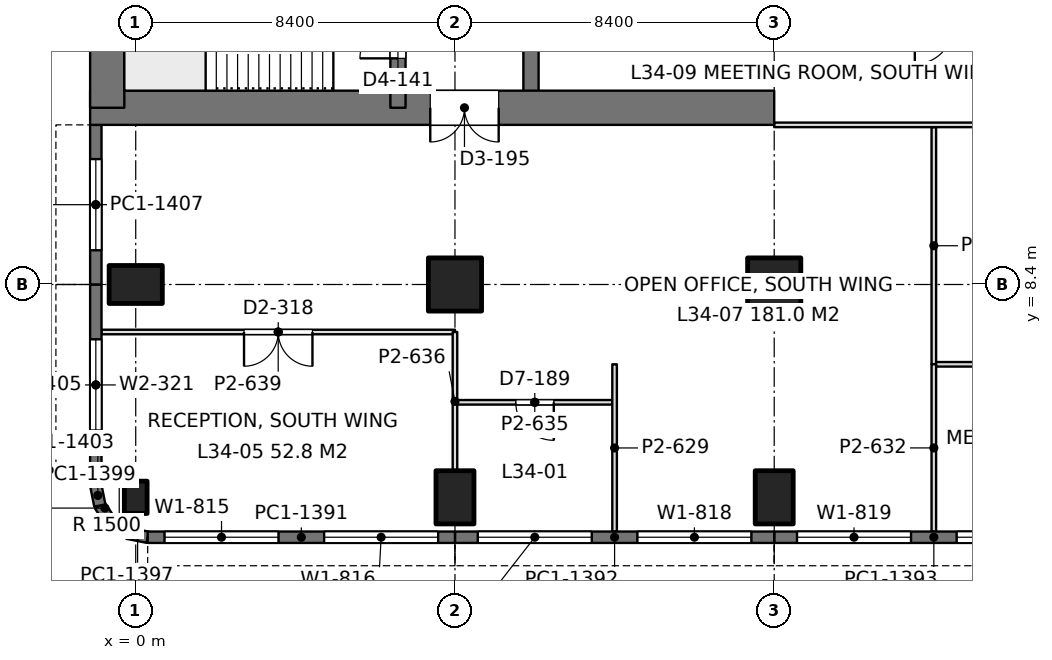
"""IFC4 building model, lengths in metres.
Left out: names, types, materials, properties, quantities, classifications, styles, units other than length and angle.
Written with IfcOpenShell. Run it as: python <this file> out.ifc"""

import sys

from ifc_helpers import new_model, si_unit, direction, frame, frame_2d, origin, origin_2d, place, context, subcontext, project, spatial, rectangle, extrude, element, fill, save


model = new_model("IFC4")
c1 = context("Model", 3, precision=1e-05, world=origin(), true_north=direction((0.0, 1.0)))
c2 = subcontext(c1, "Body", "Model", "MODEL_VIEW")
j1 = project(units=[si_unit("LENGTHUNIT", "METRE"), si_unit("PLANEANGLEUNIT", "RADIAN")], contexts=[c1])
p1 = place(None, origin())
s1 = spatial("IfcSite", under=j1, at=p1, CompositionType="ELEMENT")
p2 = place(p1, origin())
s2 = spatial("IfcBuilding", under=s1, at=p2, CompositionType="ELEMENT")
p3 = place(p2, frame((0.0, 0.0, 151.2)))
s3 = spatial("IfcBuildingStorey", under=s2, at=p3, CompositionType="ELEMENT", Elevation=151.2)
p4 = place(p3, frame((0.0, 2.8, 0.0), z_axis=(0.0, 0.0, 1.0), x_axis=(1.0, 0.0, 0.0)))
e1 = element("IfcColumn", 1, at=p4, inside=s3, PredefinedType="COLUMN", context=c2, shape_type="SweptSolid", body=[
    extrude(rectangle(XDim=0.6, YDim=0.85, at=origin_2d()), origin(), (0.0, 0.0, 1.0), 4.2),
])
for number, where, z_axis, x_axis in (
    (2, (0.0, 8.4, 0.0), (0.0, 0.0, 1.0), (0.0, 1.0, 0.0)),
    (3, (8.4, 2.8, 0.0), (0.0, 0.0, 1.0), (1.0, 0.0, 0.0)),
):
    element("IfcColumn", number, at=place(p3, frame(where, z_axis=z_axis, x_axis=x_axis)), inside=s3, PredefinedType="COLUMN", context=c2, shape_type="SweptSolid", body=[
        extrude(rectangle(XDim=1.0, YDim=1.4, at=origin_2d()), origin(), (0.0, 0.0, 1.0), 4.2),
    ])
p5 = place(p3, frame((8.4, 8.4, 0.0), z_axis=(0.0, 0.0, 1.0), x_axis=(1.0, 0.0, 0.0)))
e4 = element("IfcColumn", 4, at=p5, inside=s3, PredefinedType="COLUMN", context=c2, shape_type="SweptSolid", body=[
    extrude(rectangle(XDim=1.4, YDim=1.4, at=origin_2d()), origin(), (0.0, 0.0, 1.0), 4.2),
])
p6 = place(p3, frame((16.8, 2.8, 0.0), z_axis=(0.0, 0.0, 1.0), x_axis=(1.0, 0.0, 0.0)))
e5 = element("IfcColumn", 5, at=p6, inside=s3, PredefinedType="COLUMN", context=c2, shape_type="SweptSolid", body=[
    extrude(rectangle(XDim=1.0, YDim=1.4, at=origin_2d()), origin(), (0.0, 0.0, 1.0), 4.2),
])
p7 = place(p3, frame((16.8, 8.4, 0.0), z_axis=(0.0, 0.0, 1.0), x_axis=(1.0, 0.0, 0.0)))
e6 = element("IfcColumn", 6, at=p7, inside=s3, PredefinedType="COLUMN", context=c2, shape_type="SweptSolid", body=[
    extrude(rectangle(XDim=1.4, YDim=1.4, at=origin_2d()), origin(), (0.0, 0.0, 1.0), 4.2),
])
p8 = place(p3, frame((-1.2, 13.05, 0.0), z_axis=(0.0, 0.0, 1.0), x_axis=(1.0, 0.0, 0.0)))
e7 = element("IfcWall", 7, at=p8, inside=s3, PredefinedType="SHEAR", context=c2, shape_type="SweptSolid", body=[
    extrude(rectangle(XDim=18.0, YDim=0.9, at=frame_2d((9.0, 0.0))), origin(), (0.0, 0.0, 1.0), 4.2),
])
p9 = place(p8, frame((8.95, 0.0, 0.0)))
e8 = element("IfcOpeningElement", 8, at=p9, cuts=e7, PredefinedType="OPENING", context=c2, shape_type="SweptSolid", body=[
    extrude(rectangle(XDim=1.8, YDim=2.4, at=frame_2d((0.9, 1.2))), frame((0.0, 0.46, 0.0), z_axis=(0.0, -1.0, 0.0), x_axis=(1.0, 0.0, 0.0)), (0.0, 0.0, 1.0), 0.92),
])
p10 = place(p3, frame((-0.75, 13.05, 0.0), z_axis=(0.0, 0.0, 1.0), x_axis=(0.0, 1.0, 0.0)))
e9 = element("IfcWall", 9, at=p10, inside=s3, PredefinedType="SHEAR", context=c2, shape_type="SweptSolid", body=[
    extrude(rectangle(XDim=24.3, YDim=0.9, at=frame_2d((12.15, 0.0))), origin(), (0.0, 0.0, 1.0), 4.2),
])
p11 = place(p3, frame((6.9, 13.05, 0.0), z_axis=(0.0, 0.0, 1.0), x_axis=(0.0, 1.0, 0.0)))
e10 = element("IfcWall", 10, at=p11, inside=s3, PredefinedType="SHEAR", context=c2, shape_type="SweptSolid", body=[
    extrude(rectangle(XDim=24.3, YDim=0.4, at=frame_2d((12.15, 0.0))), origin(), (0.0, 0.0, 1.0), 4.2),
])
p12 = place(p11, frame((1.3, 0.0, 0.0)))
e11 = element("IfcOpeningElement", 11, at=p12, cuts=e10, PredefinedType="OPENING", context=c2, shape_type="SweptSolid", body=[
    extrude(rectangle(XDim=1.0, YDim=2.2, at=frame_2d((0.5, 1.1))), frame((0.0, 0.21, 0.0), z_axis=(0.0, -1.0, 0.0), x_axis=(1.0, 0.0, 0.0)), (0.0, 0.0, 1.0), 0.42),
])
p13 = place(p11, frame((22.0, 0.0, 0.0)))
e12 = element("IfcOpeningElement", 12, at=p13, cuts=e10, PredefinedType="OPENING", context=c2, shape_type="SweptSolid", body=[
    extrude(rectangle(XDim=1.0, YDim=2.2, at=frame_2d((0.5, 1.1))), frame((0.0, 0.21, 0.0), z_axis=(0.0, -1.0, 0.0), x_axis=(1.0, 0.0, 0.0)), (0.0, 0.0, 1.0), 0.42),
])
p14 = place(p11, frame((5.55, 0.0, 0.0)))
e13 = element("IfcOpeningElement", 13, at=p14, cuts=e10, PredefinedType="OPENING", context=c2, shape_type="SweptSolid", body=[
    extrude(rectangle(XDim=1.0, YDim=2.2, at=frame_2d((0.5, 1.1))), frame((0.0, 0.21, 0.0), z_axis=(0.0, -1.0, 0.0), x_axis=(1.0, 0.0, 0.0)), (0.0, 0.0, 1.0), 0.42),
])
p15 = place(p11, frame((9.55, 0.0, 0.0)))
e14 = element("IfcOpeningElement", 14, at=p15, cuts=e10, PredefinedType="OPENING", context=c2, shape_type="SweptSolid", body=[
    extrude(rectangle(XDim=1.0, YDim=2.2, at=frame_2d((0.5, 1.1))), frame((0.0, 0.21, 0.0), z_axis=(0.0, -1.0, 0.0), x_axis=(1.0, 0.0, 0.0)), (0.0, 0.0, 1.0), 0.42),
])
p16 = place(p11, frame((12.8, 0.0, 0.0)))
e15 = element("IfcOpeningElement", 15, at=p16, cuts=e10, PredefinedType="OPENING", context=c2, shape_type="SweptSolid", body=[
    extrude(rectangle(XDim=1.1, YDim=2.2, at=frame_2d((0.55, 1.1))), frame((0.0, 0.21, 0.0), z_axis=(0.0, -1.0, 0.0), x_axis=(1.0, 0.0, 0.0)), (0.0, 0.0, 1.0), 0.42),
])
p17 = place(p11, frame((15.538, 0.0, 0.0)))
e16 = element("IfcOpeningElement", 16, at=p17, cuts=e10, PredefinedType="OPENING", context=c2, shape_type="SweptSolid", body=[
    extrude(rectangle(XDim=1.1, YDim=2.2, at=frame_2d((0.55, 1.1))), frame((0.0, 0.21, 0.0), z_axis=(0.0, -1.0, 0.0), x_axis=(1.0, 0.0, 0.0)), (0.0, 0.0, 1.0), 0.42),
])
p18 = place(p11, frame((18.262, 0.0, 0.0)))
e17 = element("IfcOpeningElement", 17, at=p18, cuts=e10, PredefinedType="OPENING", context=c2, shape_type="SweptSolid", body=[
    extrude(rectangle(XDim=1.1, YDim=2.2, at=frame_2d((0.55, 1.1))), frame((0.0, 0.21, 0.0), z_axis=(0.0, -1.0, 0.0), x_axis=(1.0, 0.0, 0.0)), (0.0, 0.0, 1.0), 0.42),
])
p19 = place(p3, frame((10.4, 13.05, 0.0), z_axis=(0.0, 0.0, 1.0), x_axis=(0.0, 1.0, 0.0)))
e18 = element("IfcWall", 18, at=p19, inside=s3, PredefinedType="SHEAR", context=c2, shape_type="SweptSolid", body=[
    extrude(rectangle(XDim=24.3, YDim=0.4, at=frame_2d((12.15, 0.0))), origin(), (0.0, 0.0, 1.0), 4.2),
])
p20 = place(p19, frame((10.05, 0.0, 0.0)))
e19 = element("IfcOpeningElement", 19, at=p20, cuts=e18, PredefinedType="OPENING", context=c2, shape_type="SweptSolid", body=[
    extrude(rectangle(XDim=1.1, YDim=2.2, at=frame_2d((0.55, 1.1))), frame((0.0, 0.21, 0.0), z_axis=(0.0, -1.0, 0.0), x_axis=(1.0, 0.0, 0.0)), (0.0, 0.0, 1.0), 0.42),
])
p21 = place(p19, frame((12.9, 0.0, 0.0)))
e20 = element("IfcOpeningElement", 20, at=p21, cuts=e18, PredefinedType="OPENING", context=c2, shape_type="SweptSolid", body=[
    extrude(rectangle(XDim=1.1, YDim=2.2, at=frame_2d((0.55, 1.1))), frame((0.0, 0.21, 0.0), z_axis=(0.0, -1.0, 0.0), x_axis=(1.0, 0.0, 0.0)), (0.0, 0.0, 1.0), 0.42),
])
p22 = place(p19, frame((21.45, 0.0, 0.0)))
e21 = element("IfcOpeningElement", 21, at=p22, cuts=e18, PredefinedType="OPENING", context=c2, shape_type="SweptSolid", body=[
    extrude(rectangle(XDim=1.1, YDim=2.2, at=frame_2d((0.55, 1.1))), frame((0.0, 0.21, 0.0), z_axis=(0.0, -1.0, 0.0), x_axis=(1.0, 0.0, 0.0)), (0.0, 0.0, 1.0), 0.42),
])
p23 = place(p19, frame((2.35, 0.0, 0.0)))
e22 = element("IfcOpeningElement", 22, at=p23, cuts=e18, PredefinedType="OPENING", context=c2, shape_type="SweptSolid", body=[
    extrude(rectangle(XDim=1.8, YDim=2.4, at=frame_2d((0.9, 1.2))), frame((0.0, 0.21, 0.0), z_axis=(0.0, -1.0, 0.0), x_axis=(1.0, 0.0, 0.0)), (0.0, 0.0, 1.0), 0.42),
])
p24 = place(p19, frame((5.8, 0.0, 0.0)))
e23 = element("IfcOpeningElement", 23, at=p24, cuts=e18, PredefinedType="OPENING", context=c2, shape_type="SweptSolid", body=[
    extrude(rectangle(XDim=1.8, YDim=2.4, at=frame_2d((0.9, 1.2))), frame((0.0, 0.21, 0.0), z_axis=(0.0, -1.0, 0.0), x_axis=(1.0, 0.0, 0.0)), (0.0, 0.0, 1.0), 0.42),
])
p25 = place(p3, frame((25.2, 1.75, 0.0), z_axis=(0.0, 0.0, 1.0), x_axis=(-1.0, 0.0, 0.0)))
e24 = element("IfcWall", 24, at=p25, inside=s3, PredefinedType="SOLIDWALL", context=c2, shape_type="SweptSolid", body=[
    extrude(rectangle(XDim=8.4, YDim=0.3, at=frame_2d((4.2, 0.0))), origin(), (0.0, 0.0, 1.0), 4.05),
])
p26 = place(p25, frame((0.6, 0.0, 0.9)))
e25 = element("IfcOpeningElement", 25, at=p26, cuts=e24, PredefinedType="OPENING", context=c2, shape_type="SweptSolid", body=[
    extrude(rectangle(XDim=3.0, YDim=1.9, at=frame_2d((1.5, 0.95))), frame((0.0, 0.16, 0.0), z_axis=(0.0, -1.0, 0.0), x_axis=(1.0, 0.0, 0.0)), (0.0, 0.0, 1.0), 0.32),
])
p27 = place(p25, frame((4.8, 0.0, 0.9)))
e26 = element("IfcOpeningElement", 26, at=p27, cuts=e24, PredefinedType="OPENING", context=c2, shape_type="SweptSolid", body=[
    extrude(rectangle(XDim=3.0, YDim=1.9, at=frame_2d((1.5, 0.95))), frame((0.0, 0.16, 0.0), z_axis=(0.0, -1.0, 0.0), x_axis=(1.0, 0.0, 0.0)), (0.0, 0.0, 1.0), 0.32),
])
p28 = place(p3, frame((16.8, 1.75, 0.0), z_axis=(0.0, 0.0, 1.0), x_axis=(-1.0, 0.0, 0.0)))
e27 = element("IfcWall", 27, at=p28, inside=s3, PredefinedType="SOLIDWALL", context=c2, shape_type="SweptSolid", body=[
    extrude(rectangle(XDim=8.4, YDim=0.3, at=frame_2d((4.2, 0.0))), origin(), (0.0, 0.0, 1.0), 4.05),
])
p29 = place(p28, frame((0.6, 0.0, 0.9)))
e28 = element("IfcOpeningElement", 28, at=p29, cuts=e27, PredefinedType="OPENING", context=c2, shape_type="SweptSolid", body=[
    extrude(rectangle(XDim=3.0, YDim=1.9, at=frame_2d((1.5, 0.95))), frame((0.0, 0.16, 0.0), z_axis=(0.0, -1.0, 0.0), x_axis=(1.0, 0.0, 0.0)), (0.0, 0.0, 1.0), 0.32),
])
p30 = place(p28, frame((4.8, 0.0, 0.9)))
e29 = element("IfcOpeningElement", 29, at=p30, cuts=e27, PredefinedType="OPENING", context=c2, shape_type="SweptSolid", body=[
    extrude(rectangle(XDim=3.0, YDim=1.9, at=frame_2d((1.5, 0.95))), frame((0.0, 0.16, 0.0), z_axis=(0.0, -1.0, 0.0), x_axis=(1.0, 0.0, 0.0)), (0.0, 0.0, 1.0), 0.32),
])
p31 = place(p3, frame((8.4, 1.75, 0.0), z_axis=(0.0, 0.0, 1.0), x_axis=(-1.0, 0.0, 0.0)))
e30 = element("IfcWall", 30, at=p31, inside=s3, PredefinedType="SOLIDWALL", context=c2, shape_type="SweptSolid", body=[
    extrude(rectangle(XDim=8.085, YDim=0.3, at=frame_2d((4.042, 0.0))), origin(), (0.0, 0.0, 1.0), 4.05),
])
p32 = place(p31, frame((0.443, 0.0, 0.9)))
e31 = element("IfcOpeningElement", 31, at=p32, cuts=e30, PredefinedType="OPENING", context=c2, shape_type="SweptSolid", body=[
    extrude(rectangle(XDim=3.0, YDim=1.9, at=frame_2d((1.5, 0.95))), frame((0.0, 0.16, 0.0), z_axis=(0.0, -1.0, 0.0), x_axis=(1.0, 0.0, 0.0)), (0.0, 0.0, 1.0), 0.32),
])
p33 = place(p31, frame((4.643, 0.0, 0.9)))
e32 = element("IfcOpeningElement", 32, at=p33, cuts=e30, PredefinedType="OPENING", context=c2, shape_type="SweptSolid", body=[
    extrude(rectangle(XDim=3.0, YDim=1.9, at=frame_2d((1.5, 0.95))), frame((0.0, 0.16, 0.0), z_axis=(0.0, -1.0, 0.0), x_axis=(1.0, 0.0, 0.0)), (0.0, 0.0, 1.0), 0.32),
])
p34 = place(p3, frame((0.315, 1.75, 0.0), z_axis=(0.0, 0.0, 1.0), x_axis=(-0.980788534345, 0.195073962632, 0.0)))
e33 = element("IfcWall", 33, at=p34, inside=s3, PredefinedType="SOLIDWALL", context=c2, shape_type="SweptSolid", body=[
    extrude(rectangle(XDim=0.541, YDim=0.3, at=frame_2d((0.271, 0.0))), origin(), (0.0, 0.0, 1.0), 4.05),
])
for number, where, z_axis, x_axis in (
    (34, (-0.216, 1.855, 0.0), (0.0, 0.0, 1.0), (-0.831, 0.556, 0.0)),
    (35, (-0.653, 2.147, 0.0), (0.0, 0.0, 1.0), (-0.556, 0.831, 0.0)),
):
    element("IfcWall", number, at=place(p3, frame(where, z_axis=z_axis, x_axis=x_axis)), inside=s3, PredefinedType="SOLIDWALL", context=c2, shape_type="SweptSolid", body=[
        extrude(rectangle(XDim=0.526, YDim=0.3, at=frame_2d((0.263, 0.0))), origin(), (0.0, 0.0, 1.0), 4.05),
    ])
p35 = place(p3, frame((-0.945, 2.584, 0.0), z_axis=(0.0, 0.0, 1.0), x_axis=(-0.195073962632, 0.980788534345, 0.0)))
e36 = element("IfcWall", 36, at=p35, inside=s3, PredefinedType="SOLIDWALL", context=c2, shape_type="SweptSolid", body=[
    extrude(rectangle(XDim=0.541, YDim=0.3, at=frame_2d((0.271, 0.0))), origin(), (0.0, 0.0, 1.0), 4.05),
])
p36 = place(p3, frame((-1.05, 3.115, 0.0), z_axis=(0.0, 0.0, 1.0), x_axis=(0.0, 1.0, 0.0)))
e37 = element("IfcWall", 37, at=p36, inside=s3, PredefinedType="SOLIDWALL", context=c2, shape_type="SweptSolid", body=[
    extrude(rectangle(XDim=5.285, YDim=0.3, at=frame_2d((2.643, 0.0))), origin(), (0.0, 0.0, 1.0), 4.05),
])
p37 = place(p36, frame((1.443, 0.0, 0.9)))
e38 = element("IfcOpeningElement", 38, at=p37, cuts=e37, PredefinedType="OPENING", context=c2, shape_type="SweptSolid", body=[
    extrude(rectangle(XDim=2.4, YDim=1.9, at=frame_2d((1.2, 0.95))), frame((0.0, 0.16, 0.0), z_axis=(0.0, -1.0, 0.0), x_axis=(1.0, 0.0, 0.0)), (0.0, 0.0, 1.0), 0.32),
])
p38 = place(p3, frame((-1.05, 8.4, 0.0), z_axis=(0.0, 0.0, 1.0), x_axis=(0.0, 1.0, 0.0)))
e39 = element("IfcWall", 39, at=p38, inside=s3, PredefinedType="SOLIDWALL", context=c2, shape_type="SweptSolid", body=[
    extrude(rectangle(XDim=4.2, YDim=0.3, at=frame_2d((2.1, 0.0))), origin(), (0.0, 0.0, 1.0), 4.05),
])
p39 = place(p38, frame((0.9, 0.0, 0.9)))
e40 = element("IfcOpeningElement", 40, at=p39, cuts=e39, PredefinedType="OPENING", context=c2, shape_type="SweptSolid", body=[
    extrude(rectangle(XDim=2.4, YDim=1.9, at=frame_2d((1.2, 0.95))), frame((0.0, 0.16, 0.0), z_axis=(0.0, -1.0, 0.0), x_axis=(1.0, 0.0, 0.0)), (0.0, 0.0, 1.0), 0.32),
])
p40 = place(p3, frame((-0.902, 7.15, 0.0), z_axis=(0.0, 0.0, 1.0), x_axis=(1.0, 0.0, 0.0)))
e41 = element("IfcWall", 41, at=p40, inside=s3, PredefinedType="PARTITIONING", context=c2, shape_type="SweptSolid", body=[
    extrude(rectangle(XDim=9.302, YDim=0.12, at=frame_2d((4.651, 0.0))), origin(), (0.0, 0.0, 1.0), 3.55),
])
p41 = place(p40, frame((3.752, 0.0, 0.0)))
e42 = element("IfcOpeningElement", 42, at=p41, cuts=e41, PredefinedType="OPENING", context=c2, shape_type="SweptSolid", body=[
    extrude(rectangle(XDim=1.8, YDim=2.2, at=frame_2d((0.9, 1.1))), frame((0.0, 0.07, 0.0), z_axis=(0.0, -1.0, 0.0), x_axis=(1.0, 0.0, 0.0)), (0.0, 0.0, 1.0), 0.14),
])
p42 = place(p3, frame((8.458, 5.3, 0.0), z_axis=(0.0, 0.0, 1.0), x_axis=(1.0, 0.0, 0.0)))
e43 = element("IfcWall", 43, at=p42, inside=s3, PredefinedType="PARTITIONING", context=c2, shape_type="SweptSolid", body=[
    extrude(rectangle(XDim=4.084, YDim=0.12, at=frame_2d((2.042, 0.0))), origin(), (0.0, 0.0, 1.0), 3.55),
])
p43 = place(p42, frame((1.542, 0.0, 0.0)))
e44 = element("IfcOpeningElement", 44, at=p43, cuts=e43, PredefinedType="OPENING", context=c2, shape_type="SweptSolid", body=[
    extrude(rectangle(XDim=1.0, YDim=2.4, at=frame_2d((0.5, 1.2))), frame((0.0, 0.07, 0.0), z_axis=(0.0, -1.0, 0.0), x_axis=(1.0, 0.0, 0.0)), (0.0, 0.0, 1.0), 0.14),
])
p44 = place(p3, frame((8.4, 3.499, 0.0), z_axis=(0.0, 0.0, 1.0), x_axis=(0.0, 1.0, 0.0)))
e45 = element("IfcWall", 45, at=p44, inside=s3, PredefinedType="PARTITIONING", context=c2, shape_type="SweptSolid", body=[
    extrude(rectangle(XDim=3.651, YDim=0.12, at=frame_2d((1.825, 0.0))), origin(), (0.0, 0.0, 1.0), 3.55),
])
p45 = place(p3, frame((12.6, 1.898, 0.0), z_axis=(0.0, 0.0, 1.0), x_axis=(0.0, 1.0, 0.0)))
e46 = element("IfcWall", 46, at=p45, inside=s3, PredefinedType="PARTITIONING", context=c2, shape_type="SweptSolid", body=[
    extrude(rectangle(XDim=4.402, YDim=0.12, at=frame_2d((2.201, 0.0))), origin(), (0.0, 0.0, 1.0), 3.56),
])
p46 = place(p3, frame((21.058, 6.3, 0.0), z_axis=(0.0, 0.0, 1.0), x_axis=(1.0, 0.0, 0.0)))
e47 = element("IfcWall", 47, at=p46, inside=s3, PredefinedType="PARTITIONING", context=c2, shape_type="SweptSolid", body=[
    extrude(rectangle(XDim=8.342, YDim=0.12, at=frame_2d((4.171, 0.0))), origin(), (0.0, 0.0, 1.0), 3.55),
])
p47 = place(p46, frame((1.142, 0.0, 0.0)))
e48 = element("IfcOpeningElement", 48, at=p47, cuts=e47, PredefinedType="OPENING", context=c2, shape_type="SweptSolid", body=[
    extrude(rectangle(XDim=1.8, YDim=2.2, at=frame_2d((0.9, 1.1))), frame((0.0, 0.07, 0.0), z_axis=(0.0, -1.0, 0.0), x_axis=(1.0, 0.0, 0.0)), (0.0, 0.0, 1.0), 0.14),
])
p48 = place(p3, frame((21.0, 1.898, 0.0), z_axis=(0.0, 0.0, 1.0), x_axis=(0.0, 1.0, 0.0)))
e49 = element("IfcWall", 49, at=p48, inside=s3, PredefinedType="PARTITIONING", context=c2, shape_type="SweptSolid", body=[
    extrude(rectangle(XDim=4.404, YDim=0.12, at=frame_2d((2.202, 0.0))), origin(), (0.0, 0.0, 1.0), 3.56),
])
p49 = place(p3, frame((21.0, 6.298, 0.0), z_axis=(0.0, 0.0, 1.0), x_axis=(0.0, 1.0, 0.0)))
e50 = element("IfcWall", 50, at=p49, inside=s3, PredefinedType="PARTITIONING", context=c2, shape_type="SweptSolid", body=[
    extrude(rectangle(XDim=6.244, YDim=0.12, at=frame_2d((3.122, 0.0))), origin(), (0.0, 0.0, 1.0), 3.55),
])
p50 = place(p3, frame((16.8, 12.6, 0.0), z_axis=(0.0, 0.0, 1.0), x_axis=(1.0, 0.0, 0.0)))
e51 = element("IfcWall", 51, at=p50, inside=s3, PredefinedType="PARTITIONING", context=c2, shape_type="SweptSolid", body=[
    extrude(rectangle(XDim=16.8, YDim=0.12, at=frame_2d((8.4, 0.0))), origin(), (0.0, 0.0, 1.0), 3.55),
])
p51 = place(p26, origin())
e52 = element("IfcWindow", 52, at=p51, inside=s3, PartitioningType="SINGLE_PANEL", PredefinedType="WINDOW", context=c2, shape_type="SweptSolid", body=[
    extrude(rectangle(XDim=3.0, YDim=1.9, at=frame_2d((1.5, 0.95))), frame((0.0, 0.03, 0.0), z_axis=(0.0, -1.0, 0.0), x_axis=(1.0, 0.0, 0.0)), (0.0, 0.0, 1.0), 0.06),
])
fill(e25, e52)
p52 = place(p27, origin())
e53 = element("IfcWindow", 53, at=p52, inside=s3, PartitioningType="SINGLE_PANEL", PredefinedType="WINDOW", context=c2, shape_type="SweptSolid", body=[
    extrude(rectangle(XDim=3.0, YDim=1.9, at=frame_2d((1.5, 0.95))), frame((0.0, 0.03, 0.0), z_axis=(0.0, -1.0, 0.0), x_axis=(1.0, 0.0, 0.0)), (0.0, 0.0, 1.0), 0.06),
])
fill(e26, e53)
p53 = place(p29, origin())
e54 = element("IfcWindow", 54, at=p53, inside=s3, PartitioningType="SINGLE_PANEL", PredefinedType="WINDOW", context=c2, shape_type="SweptSolid", body=[
    extrude(rectangle(XDim=3.0, YDim=1.9, at=frame_2d((1.5, 0.95))), frame((0.0, 0.03, 0.0), z_axis=(0.0, -1.0, 0.0), x_axis=(1.0, 0.0, 0.0)), (0.0, 0.0, 1.0), 0.06),
])
fill(e28, e54)
p54 = place(p30, origin())
e55 = element("IfcWindow", 55, at=p54, inside=s3, PartitioningType="SINGLE_PANEL", PredefinedType="WINDOW", context=c2, shape_type="SweptSolid", body=[
    extrude(rectangle(XDim=3.0, YDim=1.9, at=frame_2d((1.5, 0.95))), frame((0.0, 0.03, 0.0), z_axis=(0.0, -1.0, 0.0), x_axis=(1.0, 0.0, 0.0)), (0.0, 0.0, 1.0), 0.06),
])
fill(e29, e55)
p55 = place(p32, origin())
e56 = element("IfcWindow", 56, at=p55, inside=s3, PartitioningType="SINGLE_PANEL", PredefinedType="WINDOW", context=c2, shape_type="SweptSolid", body=[
    extrude(rectangle(XDim=3.0, YDim=1.9, at=frame_2d((1.5, 0.95))), frame((0.0, 0.03, 0.0), z_axis=(0.0, -1.0, 0.0), x_axis=(1.0, 0.0, 0.0)), (0.0, 0.0, 1.0), 0.06),
])
fill(e31, e56)
p56 = place(p33, origin())
e57 = element("IfcWindow", 57, at=p56, inside=s3, PartitioningType="SINGLE_PANEL", PredefinedType="WINDOW", context=c2, shape_type="SweptSolid", body=[
    extrude(rectangle(XDim=3.0, YDim=1.9, at=frame_2d((1.5, 0.95))), frame((0.0, 0.03, 0.0), z_axis=(0.0, -1.0, 0.0), x_axis=(1.0, 0.0, 0.0)), (0.0, 0.0, 1.0), 0.06),
])
fill(e32, e57)
p57 = place(p37, origin())
e58 = element("IfcWindow", 58, at=p57, inside=s3, PartitioningType="SINGLE_PANEL", PredefinedType="WINDOW", context=c2, shape_type="SweptSolid", body=[
    extrude(rectangle(XDim=2.4, YDim=1.9, at=frame_2d((1.2, 0.95))), frame((0.0, 0.03, 0.0), z_axis=(0.0, -1.0, 0.0), x_axis=(1.0, 0.0, 0.0)), (0.0, 0.0, 1.0), 0.06),
])
fill(e38, e58)
p58 = place(p39, origin())
e59 = element("IfcWindow", 59, at=p58, inside=s3, PartitioningType="SINGLE_PANEL", PredefinedType="WINDOW", context=c2, shape_type="SweptSolid", body=[
    extrude(rectangle(XDim=2.4, YDim=1.9, at=frame_2d((1.2, 0.95))), frame((0.0, 0.03, 0.0), z_axis=(0.0, -1.0, 0.0), x_axis=(1.0, 0.0, 0.0)), (0.0, 0.0, 1.0), 0.06),
])
fill(e40, e59)
p59 = place(p9, frame((1.8, 0.0, 0.0), z_axis=(0.0, 0.0, 1.0), x_axis=(-1.0, 0.0, 0.0)))
e60 = element("IfcDoor", 60, at=p59, inside=s3, OperationType="DOUBLE_DOOR_SINGLE_SWING", PredefinedType="DOOR", context=c2, shape_type="SweptSolid", body=[
    extrude(rectangle(XDim=1.8, YDim=2.4, at=frame_2d((0.9, 1.2))), frame((0.0, 0.025, 0.0), z_axis=(0.0, -1.0, 0.0), x_axis=(1.0, 0.0, 0.0)), (0.0, 0.0, 1.0), 0.05),
])
fill(e8, e60)
p60 = place(p12, origin())
e61 = element("IfcDoor", 61, at=p60, inside=s3, OperationType="SINGLE_SWING_LEFT", PredefinedType="DOOR", context=c2, shape_type="SweptSolid", body=[
    extrude(rectangle(XDim=1.0, YDim=2.2, at=frame_2d((0.5, 1.1))), frame((0.0, 0.025, 0.0), z_axis=(0.0, -1.0, 0.0), x_axis=(1.0, 0.0, 0.0)), (0.0, 0.0, 1.0), 0.05),
])
fill(e11, e61)
p61 = place(p41, frame((1.8, 0.0, 0.0), z_axis=(0.0, 0.0, 1.0), x_axis=(-1.0, 0.0, 0.0)))
e62 = element("IfcDoor", 62, at=p61, inside=s3, OperationType="DOUBLE_DOOR_SINGLE_SWING", PredefinedType="DOOR", context=c2, shape_type="SweptSolid", body=[
    extrude(rectangle(XDim=1.8, YDim=2.2, at=frame_2d((0.9, 1.1))), frame((0.0, 0.025, 0.0), z_axis=(0.0, -1.0, 0.0), x_axis=(1.0, 0.0, 0.0)), (0.0, 0.0, 1.0), 0.05),
])
fill(e42, e62)
p62 = place(p43, frame((1.0, 0.0, 0.0), z_axis=(0.0, 0.0, 1.0), x_axis=(-1.0, 0.0, 0.0)))
e63 = element("IfcDoor", 63, at=p62, inside=s3, OperationType="SINGLE_SWING_LEFT", PredefinedType="DOOR", context=c2, shape_type="SweptSolid", body=[
    extrude(rectangle(XDim=1.0, YDim=2.4, at=frame_2d((0.5, 1.2))), frame((0.0, 0.025, 0.0), z_axis=(0.0, -1.0, 0.0), x_axis=(1.0, 0.0, 0.0)), (0.0, 0.0, 1.0), 0.05),
])
fill(e44, e63)
save(model, sys.argv[1])
